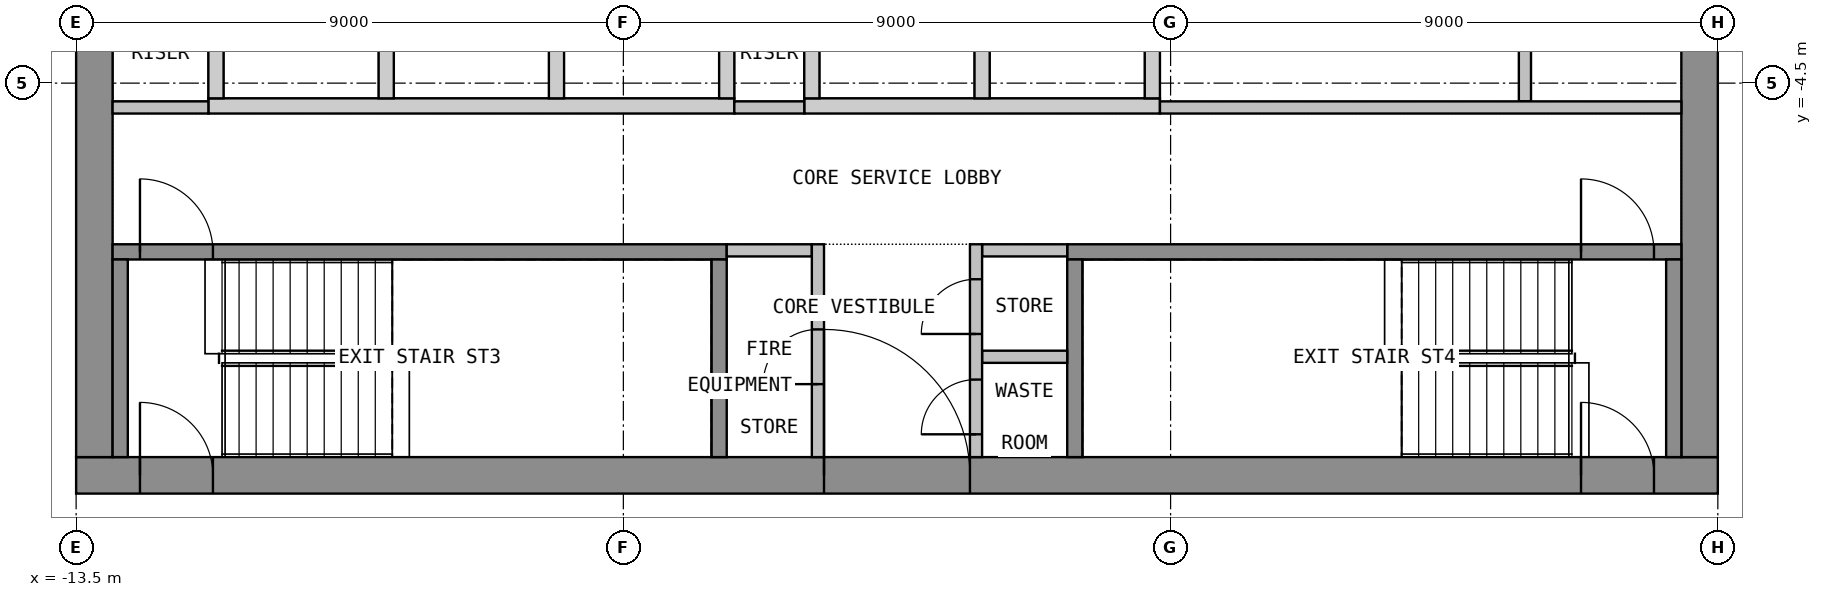
"""IFC4 building model, lengths in metres.
Left out: names, types, materials, properties, quantities, classifications, styles, units other than length and angle.
Written with IfcOpenShell. Run it as: python <this file> out.ifc"""

import sys

from ifc_helpers import new_model, si_unit, direction, frame, frame_2d, origin, place, context, subcontext, project, spatial, polyline, rectangle, outline, extrude, element, fill, save


model = new_model("IFC4")
c1 = context("Model", 3, precision=1e-05, world=origin(), true_north=direction((0.0, 1.0)))
c2 = subcontext(c1, "Body", "Model", "MODEL_VIEW")
j1 = project(units=[si_unit("LENGTHUNIT", "METRE"), si_unit("PLANEANGLEUNIT", "RADIAN")], contexts=[c1])
p1 = place(None, origin())
s1 = spatial("IfcSite", under=j1, at=p1, CompositionType="ELEMENT")
p2 = place(p1, origin())
s2 = spatial("IfcBuilding", under=s1, at=p2, CompositionType="ELEMENT")
p3 = place(p2, frame((0.0, 0.0, 246.9)))
s3 = spatial("IfcBuildingStorey", under=s2, at=p3, CompositionType="ELEMENT", Elevation=246.9)
p4 = place(p3, frame((-13.5, -10.95, 0.0), z_axis=(0.0, 0.0, 1.0), x_axis=(1.0, 0.0, 0.0)))
e1 = element("IfcWall", 1, at=p4, inside=s3, PredefinedType="SHEAR", context=c2, shape_type="SweptSolid", body=[
    extrude(rectangle(XDim=27.0, YDim=0.6, at=frame_2d((13.5, 0.0))), origin(), (0.0, 0.0, 1.0), 3.575),
])
p5 = place(p4, frame((12.3, 0.0, 0.0)))
e2 = element("IfcOpeningElement", 2, at=p5, cuts=e1, PredefinedType="OPENING", context=c2, shape_type="SweptSolid", body=[
    extrude(rectangle(XDim=2.4, YDim=2.1, at=frame_2d((1.2, 1.05))), frame((0.0, 0.31, 0.0), z_axis=(0.0, -1.0, 0.0), x_axis=(1.0, 0.0, 0.0)), (0.0, 0.0, 1.0), 0.62),
])
p6 = place(p4, frame((1.05, 0.0, 0.0)))
e3 = element("IfcOpeningElement", 3, at=p6, cuts=e1, PredefinedType="OPENING", context=c2, shape_type="SweptSolid", body=[
    extrude(rectangle(XDim=1.2, YDim=2.1, at=frame_2d((0.6, 1.05))), frame((0.0, 0.31, 0.0), z_axis=(0.0, -1.0, 0.0), x_axis=(1.0, 0.0, 0.0)), (0.0, 0.0, 1.0), 0.62),
])
p7 = place(p4, frame((24.75, 0.0, 0.0)))
e4 = element("IfcOpeningElement", 4, at=p7, cuts=e1, PredefinedType="OPENING", context=c2, shape_type="SweptSolid", body=[
    extrude(rectangle(XDim=1.2, YDim=2.1, at=frame_2d((0.6, 1.05))), frame((0.0, 0.31, 0.0), z_axis=(0.0, -1.0, 0.0), x_axis=(1.0, 0.0, 0.0)), (0.0, 0.0, 1.0), 0.62),
])
p8 = place(p3, frame((-13.2, -10.65, 0.0), z_axis=(0.0, 0.0, 1.0), x_axis=(0.0, 1.0, 0.0)))
e5 = element("IfcWall", 5, at=p8, inside=s3, PredefinedType="SHEAR", context=c2, shape_type="SweptSolid", body=[
    extrude(rectangle(XDim=21.3, YDim=0.6, at=frame_2d((10.65, 0.0))), origin(), (0.0, 0.0, 1.0), 3.575),
])
p9 = place(p8, frame((9.45, 0.0, 0.0)))
e6 = element("IfcOpeningElement", 6, at=p9, cuts=e5, PredefinedType="OPENING", context=c2, shape_type="SweptSolid", body=[
    extrude(rectangle(XDim=2.4, YDim=2.1, at=frame_2d((1.2, 1.05))), frame((0.0, 0.31, 0.0), z_axis=(0.0, -1.0, 0.0), x_axis=(1.0, 0.0, 0.0)), (0.0, 0.0, 1.0), 0.62),
])
p10 = place(p3, frame((13.2, -10.65, 0.0), z_axis=(0.0, 0.0, 1.0), x_axis=(0.0, 1.0, 0.0)))
e7 = element("IfcWall", 7, at=p10, inside=s3, PredefinedType="SHEAR", context=c2, shape_type="SweptSolid", body=[
    extrude(rectangle(XDim=21.3, YDim=0.6, at=frame_2d((10.65, 0.0))), origin(), (0.0, 0.0, 1.0), 3.575),
])
p11 = place(p10, frame((9.45, 0.0, 0.0)))
e8 = element("IfcOpeningElement", 8, at=p11, cuts=e7, PredefinedType="OPENING", context=c2, shape_type="SweptSolid", body=[
    extrude(rectangle(XDim=2.4, YDim=2.1, at=frame_2d((1.2, 1.05))), frame((0.0, 0.31, 0.0), z_axis=(0.0, -1.0, 0.0), x_axis=(1.0, 0.0, 0.0)), (0.0, 0.0, 1.0), 0.62),
])
p12 = place(p3, origin())
e9 = element("IfcWall", 9, at=p12, inside=s3, PredefinedType="SHEAR", context=c2, shape_type="SweptSolid", body=[
    extrude(outline(polyline([(-11.325, -5.0), (-2.675, -5.0), (-2.675, -4.75), (-11.325, -4.75), (-11.325, -5.0)])), origin(), (0.0, 0.0, 1.0), 3.575),
])
p13 = place(p3, origin())
e10 = element("IfcWall", 10, at=p13, inside=s3, PredefinedType="SHEAR", context=c2, shape_type="SweptSolid", body=[
    extrude(outline(polyline([(-1.525, -5.0), (4.325, -5.0), (4.325, -4.75), (-1.525, -4.75), (-1.525, -5.0)])), origin(), (0.0, 0.0, 1.0), 3.575),
])
p14 = place(p3, origin())
e11 = element("IfcWall", 11, at=p14, inside=s3, PredefinedType="SHEAR", context=c2, shape_type="SweptSolid", body=[
    extrude(outline(polyline([(-11.325, -4.75), (-11.075, -4.75), (-11.075, -2.05), (-11.325, -2.05), (-11.325, -4.75)])), origin(), (0.0, 0.0, 1.0), 3.575),
])
p15 = place(p3, origin())
e12 = element("IfcWall", 12, at=p15, inside=s3, PredefinedType="SHEAR", context=c2, shape_type="SweptSolid", body=[
    extrude(outline(polyline([(-8.525, -4.75), (-8.275, -4.75), (-8.275, -2.05), (-8.525, -2.05), (-8.525, -4.75)])), origin(), (0.0, 0.0, 1.0), 3.575),
])
p16 = place(p3, origin())
e13 = element("IfcWall", 13, at=p16, inside=s3, PredefinedType="SHEAR", context=c2, shape_type="SweptSolid", body=[
    extrude(outline(polyline([(-5.725, -4.75), (-5.475, -4.75), (-5.475, -2.05), (-5.725, -2.05), (-5.725, -4.75)])), origin(), (0.0, 0.0, 1.0), 3.575),
])
p17 = place(p3, origin())
e14 = element("IfcWall", 14, at=p17, inside=s3, PredefinedType="SHEAR", context=c2, shape_type="SweptSolid", body=[
    extrude(outline(polyline([(-2.925, -4.75), (-2.675, -4.75), (-2.675, -2.05), (-2.925, -2.05), (-2.925, -4.75)])), origin(), (0.0, 0.0, 1.0), 3.575),
])
p18 = place(p3, origin())
e15 = element("IfcWall", 15, at=p18, inside=s3, PredefinedType="SHEAR", context=c2, shape_type="SweptSolid", body=[
    extrude(outline(polyline([(-1.525, -4.75), (-1.275, -4.75), (-1.275, -2.05), (-1.525, -2.05), (-1.525, -4.75)])), origin(), (0.0, 0.0, 1.0), 3.575),
])
p19 = place(p3, origin())
e16 = element("IfcWall", 16, at=p19, inside=s3, PredefinedType="SHEAR", context=c2, shape_type="SweptSolid", body=[
    extrude(outline(polyline([(1.275, -4.75), (1.525, -4.75), (1.525, -2.05), (1.275, -2.05), (1.275, -4.75)])), origin(), (0.0, 0.0, 1.0), 3.575),
])
p20 = place(p3, origin())
e17 = element("IfcWall", 17, at=p20, inside=s3, PredefinedType="SHEAR", context=c2, shape_type="SweptSolid", body=[
    extrude(outline(polyline([(4.075, -4.75), (4.325, -4.75), (4.325, -2.05), (4.075, -2.05), (4.075, -4.75)])), origin(), (0.0, 0.0, 1.0), 3.575),
])
p21 = place(p3, frame((-12.9, -7.275, 0.0), z_axis=(0.0, 0.0, 1.0), x_axis=(1.0, 0.0, 0.0)))
e18 = element("IfcWall", 18, at=p21, inside=s3, PredefinedType="SHEAR", context=c2, shape_type="SweptSolid", body=[
    extrude(rectangle(XDim=10.1, YDim=0.25, at=frame_2d((5.05, 0.0))), origin(), (0.0, 0.0, 1.0), 3.575),
])
p22 = place(p21, frame((0.45, 0.0, 0.0)))
e19 = element("IfcOpeningElement", 19, at=p22, cuts=e18, PredefinedType="OPENING", context=c2, shape_type="SweptSolid", body=[
    extrude(rectangle(XDim=1.2, YDim=2.1, at=frame_2d((0.6, 1.05))), frame((0.0, 0.135, 0.0), z_axis=(0.0, -1.0, 0.0), x_axis=(1.0, 0.0, 0.0)), (0.0, 0.0, 1.0), 0.27),
])
for number, where, z_axis, x_axis in (
    (20, (-12.775, -10.65, 0.0), (0.0, 0.0, 1.0), (0.0, 1.0, 0.0)),
    (21, (-2.925, -10.65, 0.0), (0.0, 0.0, 1.0), (0.0, 1.0, 0.0)),
):
    element("IfcWall", number, at=place(p3, frame(where, z_axis=z_axis, x_axis=x_axis)), inside=s3, PredefinedType="SHEAR", context=c2, shape_type="SweptSolid", body=[
        extrude(rectangle(XDim=3.25, YDim=0.25, at=frame_2d((1.625, 0.0))), origin(), (0.0, 0.0, 1.0), 3.575),
    ])
p23 = place(p3, frame((2.8, -7.275, 0.0), z_axis=(0.0, 0.0, 1.0), x_axis=(1.0, 0.0, 0.0)))
e22 = element("IfcWall", 22, at=p23, inside=s3, PredefinedType="SHEAR", context=c2, shape_type="SweptSolid", body=[
    extrude(rectangle(XDim=10.1, YDim=0.25, at=frame_2d((5.05, 0.0))), origin(), (0.0, 0.0, 1.0), 3.575),
])
p24 = place(p23, frame((8.45, 0.0, 0.0)))
e23 = element("IfcOpeningElement", 23, at=p24, cuts=e22, PredefinedType="OPENING", context=c2, shape_type="SweptSolid", body=[
    extrude(rectangle(XDim=1.2, YDim=2.1, at=frame_2d((0.6, 1.05))), frame((0.0, 0.135, 0.0), z_axis=(0.0, -1.0, 0.0), x_axis=(1.0, 0.0, 0.0)), (0.0, 0.0, 1.0), 0.27),
])
for number, where, z_axis, x_axis in (
    (24, (2.925, -10.65, 0.0), (0.0, 0.0, 1.0), (0.0, 1.0, 0.0)),
    (25, (12.775, -10.65, 0.0), (0.0, 0.0, 1.0), (0.0, 1.0, 0.0)),
):
    element("IfcWall", number, at=place(p3, frame(where, z_axis=z_axis, x_axis=x_axis)), inside=s3, PredefinedType="SHEAR", context=c2, shape_type="SweptSolid", body=[
        extrude(rectangle(XDim=3.25, YDim=0.25, at=frame_2d((1.625, 0.0))), origin(), (0.0, 0.0, 1.0), 3.575),
    ])
for number, where, z_axis, x_axis in (
    (26, (-2.8, -7.25, 0.0), (0.0, 0.0, 1.0), (1.0, 0.0, 0.0)),
    (27, (1.4, -7.25, 0.0), (0.0, 0.0, 1.0), (1.0, 0.0, 0.0)),
    (28, (1.4, -9.0, 0.0), (0.0, 0.0, 1.0), (1.0, 0.0, 0.0)),
):
    element("IfcWall", number, at=place(p3, frame(where, z_axis=z_axis, x_axis=x_axis)), inside=s3, PredefinedType="PARTITIONING", context=c2, shape_type="SweptSolid", body=[
        extrude(rectangle(XDim=1.4, YDim=0.2, at=frame_2d((0.7, 0.0))), origin(), (0.0, 0.0, 1.0), 3.575),
    ])
p25 = place(p3, frame((-1.3, -10.65, 0.0), z_axis=(0.0, 0.0, 1.0), x_axis=(0.0, 1.0, 0.0)))
e29 = element("IfcWall", 29, at=p25, inside=s3, PredefinedType="PARTITIONING", context=c2, shape_type="SweptSolid", body=[
    extrude(rectangle(XDim=3.5, YDim=0.2, at=frame_2d((1.75, 0.0))), origin(), (0.0, 0.0, 1.0), 3.575),
])
p26 = place(p25, frame((1.2, 0.0, 0.0)))
e30 = element("IfcOpeningElement", 30, at=p26, cuts=e29, PredefinedType="OPENING", context=c2, shape_type="SweptSolid", body=[
    extrude(rectangle(XDim=0.9, YDim=2.1, at=frame_2d((0.45, 1.05))), frame((0.0, 0.11, 0.0), z_axis=(0.0, -1.0, 0.0), x_axis=(1.0, 0.0, 0.0)), (0.0, 0.0, 1.0), 0.22),
])
p27 = place(p3, frame((1.3, -10.65, 0.0), z_axis=(0.0, 0.0, 1.0), x_axis=(0.0, 1.0, 0.0)))
e31 = element("IfcWall", 31, at=p27, inside=s3, PredefinedType="PARTITIONING", context=c2, shape_type="SweptSolid", body=[
    extrude(rectangle(XDim=3.5, YDim=0.2, at=frame_2d((1.75, 0.0))), origin(), (0.0, 0.0, 1.0), 3.575),
])
p28 = place(p27, frame((0.375, 0.0, 0.0)))
e32 = element("IfcOpeningElement", 32, at=p28, cuts=e31, PredefinedType="OPENING", context=c2, shape_type="SweptSolid", body=[
    extrude(rectangle(XDim=0.9, YDim=2.1, at=frame_2d((0.45, 1.05))), frame((0.0, 0.11, 0.0), z_axis=(0.0, -1.0, 0.0), x_axis=(1.0, 0.0, 0.0)), (0.0, 0.0, 1.0), 0.22),
])
p29 = place(p27, frame((2.025, 0.0, 0.0)))
e33 = element("IfcOpeningElement", 33, at=p29, cuts=e31, PredefinedType="OPENING", context=c2, shape_type="SweptSolid", body=[
    extrude(rectangle(XDim=0.9, YDim=2.1, at=frame_2d((0.45, 1.05))), frame((0.0, 0.11, 0.0), z_axis=(0.0, -1.0, 0.0), x_axis=(1.0, 0.0, 0.0)), (0.0, 0.0, 1.0), 0.22),
])
p30 = place(p3, frame((-12.9, -4.9, 0.0), z_axis=(0.0, 0.0, 1.0), x_axis=(1.0, 0.0, 0.0)))
e34 = element("IfcWall", 34, at=p30, inside=s3, PredefinedType="PARTITIONING", context=c2, shape_type="SweptSolid", body=[
    extrude(rectangle(XDim=1.575, YDim=0.2, at=frame_2d((0.788, 0.0))), origin(), (0.0, 0.0, 1.0), 3.575),
])
p31 = place(p3, frame((-2.675, -4.9, 0.0), z_axis=(0.0, 0.0, 1.0), x_axis=(1.0, 0.0, 0.0)))
e35 = element("IfcWall", 35, at=p31, inside=s3, PredefinedType="PARTITIONING", context=c2, shape_type="SweptSolid", body=[
    extrude(rectangle(XDim=1.15, YDim=0.2, at=frame_2d((0.575, 0.0))), origin(), (0.0, 0.0, 1.0), 3.575),
])
p32 = place(p3, frame((10.327, -4.8, 0.0), z_axis=(0.0, 0.0, 1.0), x_axis=(0.0, 1.0, 0.0)))
e36 = element("IfcWall", 36, at=p32, inside=s3, PredefinedType="PARTITIONING", context=c2, shape_type="SweptSolid", body=[
    extrude(rectangle(XDim=2.8, YDim=0.2, at=frame_2d((1.4, 0.0))), origin(), (0.0, 0.0, 1.0), 3.575),
])
p33 = place(p3, frame((4.325, -4.9, 0.0), z_axis=(0.0, 0.0, 1.0), x_axis=(1.0, 0.0, 0.0)))
e37 = element("IfcWall", 37, at=p33, inside=s3, PredefinedType="PARTITIONING", context=c2, shape_type="SweptSolid", body=[
    extrude(rectangle(XDim=8.575, YDim=0.2, at=frame_2d((4.288, 0.0))), origin(), (0.0, 0.0, 1.0), 3.575),
])
p34 = place(p5, origin())
e38 = element("IfcDoor", 38, at=p34, inside=s3, OperationType="DOUBLE_DOOR_DOUBLE_SWING", PredefinedType="DOOR", context=c2, shape_type="SweptSolid", body=[
    extrude(rectangle(XDim=2.4, YDim=2.1, at=frame_2d((1.2, 1.05))), frame((0.0, 0.025, 0.0), z_axis=(0.0, -1.0, 0.0), x_axis=(1.0, 0.0, 0.0)), (0.0, 0.0, 1.0), 0.05),
])
fill(e2, e38)
p35 = place(p6, origin())
e39 = element("IfcDoor", 39, at=p35, inside=s3, OperationType="SINGLE_SWING_RIGHT", PredefinedType="DOOR", context=c2, shape_type="SweptSolid", body=[
    extrude(rectangle(XDim=1.2, YDim=2.1, at=frame_2d((0.6, 1.05))), frame((0.0, 0.025, 0.0), z_axis=(0.0, -1.0, 0.0), x_axis=(1.0, 0.0, 0.0)), (0.0, 0.0, 1.0), 0.05),
])
fill(e3, e39)
p36 = place(p7, origin())
e40 = element("IfcDoor", 40, at=p36, inside=s3, OperationType="SINGLE_SWING_RIGHT", PredefinedType="DOOR", context=c2, shape_type="SweptSolid", body=[
    extrude(rectangle(XDim=1.2, YDim=2.1, at=frame_2d((0.6, 1.05))), frame((0.0, 0.025, 0.0), z_axis=(0.0, -1.0, 0.0), x_axis=(1.0, 0.0, 0.0)), (0.0, 0.0, 1.0), 0.05),
])
fill(e4, e40)
p37 = place(p22, origin())
e41 = element("IfcDoor", 41, at=p37, inside=s3, OperationType="SINGLE_SWING_LEFT", PredefinedType="DOOR", context=c2, shape_type="SweptSolid", body=[
    extrude(rectangle(XDim=1.2, YDim=2.1, at=frame_2d((0.6, 1.05))), frame((0.0, 0.025, 0.0), z_axis=(0.0, -1.0, 0.0), x_axis=(1.0, 0.0, 0.0)), (0.0, 0.0, 1.0), 0.05),
])
fill(e19, e41)
p38 = place(p24, origin())
e42 = element("IfcDoor", 42, at=p38, inside=s3, OperationType="SINGLE_SWING_LEFT", PredefinedType="DOOR", context=c2, shape_type="SweptSolid", body=[
    extrude(rectangle(XDim=1.2, YDim=2.1, at=frame_2d((0.6, 1.05))), frame((0.0, 0.025, 0.0), z_axis=(0.0, -1.0, 0.0), x_axis=(1.0, 0.0, 0.0)), (0.0, 0.0, 1.0), 0.05),
])
fill(e23, e42)
p39 = place(p26, origin())
e43 = element("IfcDoor", 43, at=p39, inside=s3, OperationType="SINGLE_SWING_LEFT", PredefinedType="DOOR", context=c2, shape_type="SweptSolid", body=[
    extrude(rectangle(XDim=0.9, YDim=2.1, at=frame_2d((0.45, 1.05))), frame((0.0, 0.025, 0.0), z_axis=(0.0, -1.0, 0.0), x_axis=(1.0, 0.0, 0.0)), (0.0, 0.0, 1.0), 0.05),
])
fill(e30, e43)
p40 = place(p28, origin())
e44 = element("IfcDoor", 44, at=p40, inside=s3, OperationType="SINGLE_SWING_LEFT", PredefinedType="DOOR", context=c2, shape_type="SweptSolid", body=[
    extrude(rectangle(XDim=0.9, YDim=2.1, at=frame_2d((0.45, 1.05))), frame((0.0, 0.025, 0.0), z_axis=(0.0, -1.0, 0.0), x_axis=(1.0, 0.0, 0.0)), (0.0, 0.0, 1.0), 0.05),
])
fill(e32, e44)
p41 = place(p29, origin())
e45 = element("IfcDoor", 45, at=p41, inside=s3, OperationType="SINGLE_SWING_LEFT", PredefinedType="DOOR", context=c2, shape_type="SweptSolid", body=[
    extrude(rectangle(XDim=0.9, YDim=2.1, at=frame_2d((0.45, 1.05))), frame((0.0, 0.025, 0.0), z_axis=(0.0, -1.0, 0.0), x_axis=(1.0, 0.0, 0.0)), (0.0, 0.0, 1.0), 0.05),
])
fill(e33, e45)
save(model, sys.argv[1])
